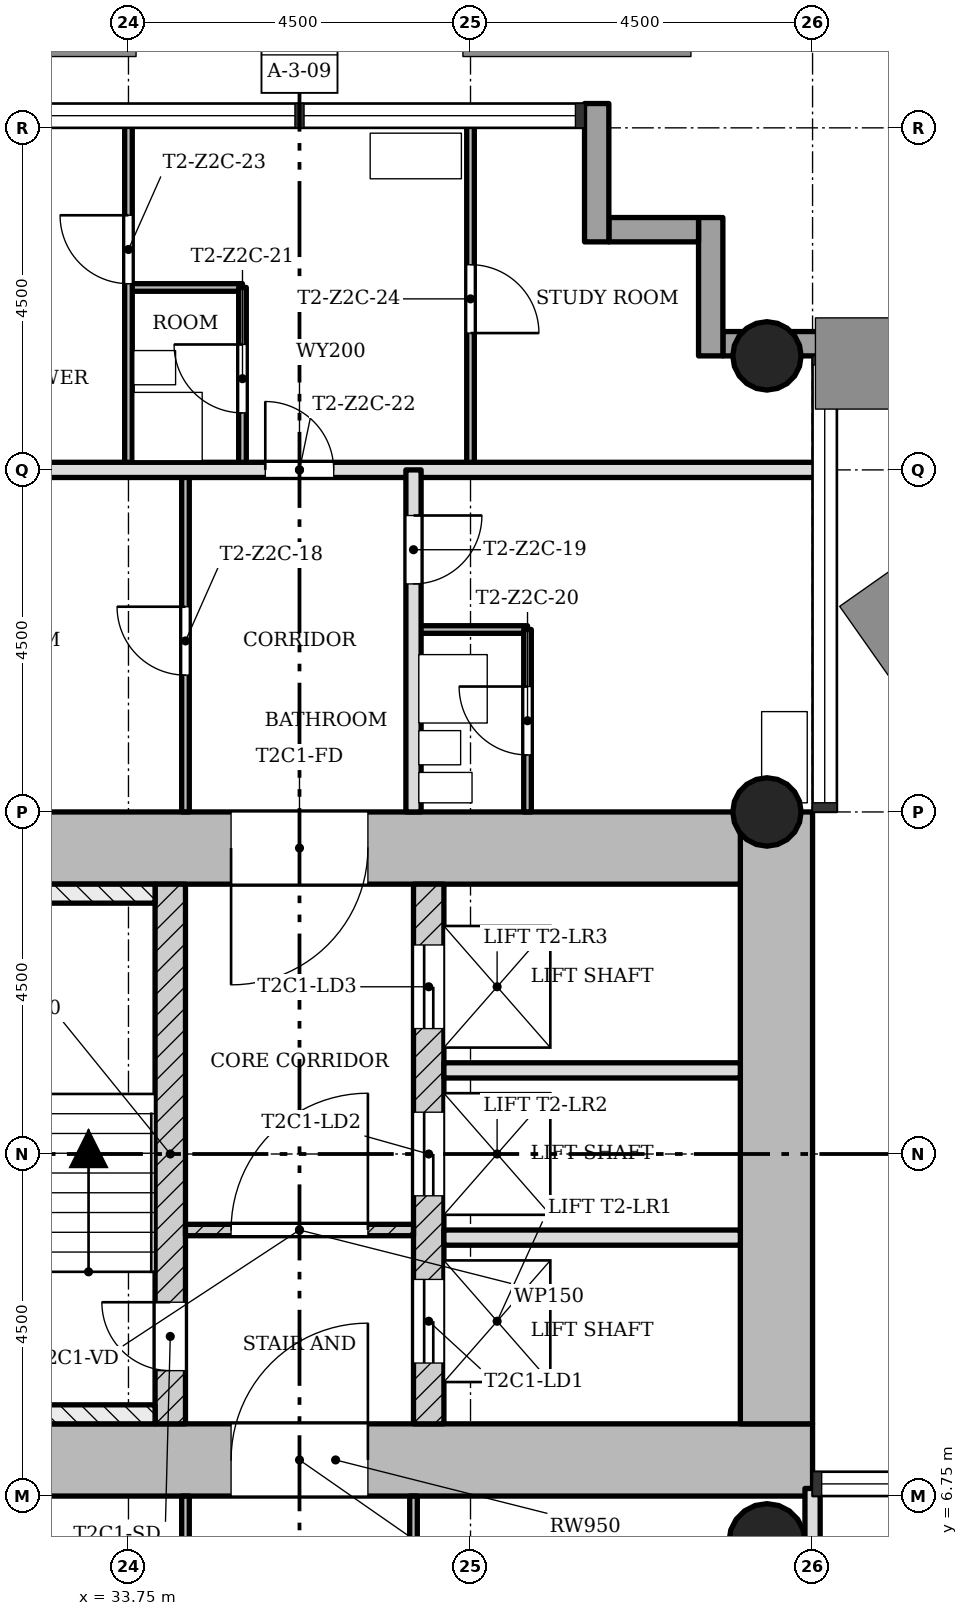
"""IFC4 building model, lengths in metres.
Left out: names, types, materials, properties, quantities, classifications, styles, units other than length and angle.
Written with IfcOpenShell. Run it as: python <this file> out.ifc"""

import sys

from ifc_helpers import new_model, si_unit, direction, frame, frame_2d, origin, origin_2d, place, context, subcontext, project, spatial, rectangle, hollow_circle, extrude, element, fill, save


model = new_model("IFC4")
c1 = context("Model", 3, precision=1e-05, world=origin(), true_north=direction((0.0, 1.0)))
c2 = subcontext(c1, "Body", "Model", "MODEL_VIEW")
j1 = project(units=[si_unit("LENGTHUNIT", "METRE"), si_unit("PLANEANGLEUNIT", "RADIAN")], contexts=[c1])
p1 = place(None, origin())
s1 = spatial("IfcSite", under=j1, at=p1, CompositionType="ELEMENT")
p2 = place(p1, origin())
s2 = spatial("IfcBuilding", under=s1, at=p2, CompositionType="ELEMENT")
p3 = place(p2, frame((0.0, 0.0, 86.8)))
s3 = spatial("IfcBuildingStorey", under=s2, at=p3, CompositionType="ELEMENT", Elevation=86.8)
p4 = place(p3, frame((30.2, 7.225, 0.0), z_axis=(0.0, 0.0, 1.0), x_axis=(1.0, 0.0, 0.0)))
e1 = element("IfcWall", 1, at=p4, inside=s3, PredefinedType="SHEAR", context=c2, shape_type="SweptSolid", body=[
    extrude(rectangle(XDim=12.55, YDim=0.95, at=frame_2d((6.275, 0.0))), origin(), (0.0, 0.0, 1.0), 3.4),
])
p5 = place(p4, frame((4.9, 0.0, 0.0)))
e2 = element("IfcOpeningElement", 2, at=p5, cuts=e1, PredefinedType="OPENING", context=c2, shape_type="SweptSolid", body=[
    extrude(rectangle(XDim=1.8, YDim=2.1, at=frame_2d((0.9, 1.05))), frame((0.0, 0.485, 0.0), z_axis=(0.0, -1.0, 0.0), x_axis=(1.0, 0.0, 0.0)), (0.0, 0.0, 1.0), 0.97),
])
p6 = place(p3, frame((42.275, 7.7, 0.0), z_axis=(0.0, 0.0, 1.0), x_axis=(0.0, 1.0, 0.0)))
e3 = element("IfcWall", 3, at=p6, inside=s3, PredefinedType="SHEAR", context=c2, shape_type="SweptSolid", body=[
    extrude(rectangle(XDim=8.05, YDim=0.95, at=frame_2d((4.025, 0.0))), origin(), (0.0, 0.0, 1.0), 3.4),
])
p7 = place(p3, frame((41.8, 15.275, 0.0), z_axis=(0.0, 0.0, 1.0), x_axis=(-1.0, 0.0, 0.0)))
e4 = element("IfcWall", 4, at=p7, inside=s3, PredefinedType="SHEAR", context=c2, shape_type="SweptSolid", body=[
    extrude(rectangle(XDim=12.55, YDim=0.95, at=frame_2d((6.275, 0.0))), origin(), (0.0, 0.0, 1.0), 3.4),
])
p8 = place(p7, frame((4.9, 0.0, 0.0)))
e5 = element("IfcOpeningElement", 5, at=p8, cuts=e4, PredefinedType="OPENING", context=c2, shape_type="SweptSolid", body=[
    extrude(rectangle(XDim=1.8, YDim=2.1, at=frame_2d((0.9, 1.05))), frame((0.0, 0.485, 0.0), z_axis=(0.0, -1.0, 0.0), x_axis=(1.0, 0.0, 0.0)), (0.0, 0.0, 1.0), 0.97),
])
p9 = place(p3, frame((34.3, 7.7, 0.0), z_axis=(0.0, 0.0, 1.0), x_axis=(0.0, 1.0, 0.0)))
e6 = element("IfcWall", 6, at=p9, inside=s3, PredefinedType="SHEAR", context=c2, shape_type="SweptSolid", body=[
    extrude(rectangle(XDim=7.1, YDim=0.4, at=frame_2d((3.55, 0.0))), origin(), (0.0, 0.0, 1.0), 3.4),
])
p10 = place(p9, frame((0.7, 0.0, 0.0)))
e7 = element("IfcOpeningElement", 7, at=p10, cuts=e6, PredefinedType="OPENING", context=c2, shape_type="SweptSolid", body=[
    extrude(rectangle(XDim=0.9, YDim=2.1, at=frame_2d((0.45, 1.05))), frame((0.0, 0.21, 0.0), z_axis=(0.0, -1.0, 0.0), x_axis=(1.0, 0.0, 0.0)), (0.0, 0.0, 1.0), 0.42),
])
p11 = place(p3, frame((37.7, 7.7, 0.0), z_axis=(0.0, 0.0, 1.0), x_axis=(0.0, 1.0, 0.0)))
e8 = element("IfcWall", 8, at=p11, inside=s3, PredefinedType="SHEAR", context=c2, shape_type="SweptSolid", body=[
    extrude(rectangle(XDim=7.1, YDim=0.4, at=frame_2d((3.55, 0.0))), origin(), (0.0, 0.0, 1.0), 3.4),
])
p12 = place(p11, frame((0.8, 0.0, 0.0)))
e9 = element("IfcOpeningElement", 9, at=p12, cuts=e8, PredefinedType="OPENING", context=c2, shape_type="SweptSolid", body=[
    extrude(rectangle(XDim=1.1, YDim=2.1, at=frame_2d((0.55, 1.05))), frame((0.0, 0.21, 0.0), z_axis=(0.0, -1.0, 0.0), x_axis=(1.0, 0.0, 0.0)), (0.0, 0.0, 1.0), 0.42),
])
p13 = place(p11, frame((3.0, 0.0, 0.0)))
e10 = element("IfcOpeningElement", 10, at=p13, cuts=e8, PredefinedType="OPENING", context=c2, shape_type="SweptSolid", body=[
    extrude(rectangle(XDim=1.1, YDim=2.1, at=frame_2d((0.55, 1.05))), frame((0.0, 0.21, 0.0), z_axis=(0.0, -1.0, 0.0), x_axis=(1.0, 0.0, 0.0)), (0.0, 0.0, 1.0), 0.42),
])
p14 = place(p11, frame((5.2, 0.0, 0.0)))
e11 = element("IfcOpeningElement", 11, at=p14, cuts=e8, PredefinedType="OPENING", context=c2, shape_type="SweptSolid", body=[
    extrude(rectangle(XDim=1.1, YDim=2.1, at=frame_2d((0.55, 1.05))), frame((0.0, 0.21, 0.0), z_axis=(0.0, -1.0, 0.0), x_axis=(1.0, 0.0, 0.0)), (0.0, 0.0, 1.0), 0.42),
])
for number, where, z_axis, x_axis in (
    (12, (42.15, 15.75, 0.0), (0.0, 0.0, 1.0), (1.0, 0.0, 0.0)),
    (13, (42.15, 21.75, 0.0), (0.0, 0.0, 1.0), (1.0, 0.0, 0.0)),
):
    element("IfcColumn", number, at=place(p3, frame(where, z_axis=z_axis, x_axis=x_axis)), inside=s3, PredefinedType="COLUMN", context=c2, shape_type="SweptSolid", body=[
        extrude(hollow_circle(Radius=0.45, WallThickness=0.032, at=origin_2d()), origin(), (0.0, 0.0, 1.0), 3.4),
    ])
p15 = place(p3, frame((42.15, 6.15, 0.0), z_axis=(0.0, 0.0, 1.0), x_axis=(1.0, 0.0, 0.0)))
e14 = element("IfcColumn", 14, at=p15, inside=s3, PredefinedType="COLUMN", context=c2, shape_type="SweptSolid", body=[
    extrude(hollow_circle(Radius=0.5, WallThickness=0.036, at=origin_2d()), origin(), (0.0, 0.0, 1.0), 3.4),
])
p16 = place(p3, frame((43.07, 21.91, -0.3), z_axis=(0.0, 0.0, 1.0), x_axis=(-1.0, 0.0, 0.0)))
e15 = element("IfcWall", 15, at=p16, inside=s3, PredefinedType="STANDARD", context=c2, shape_type="SweptSolid", body=[
    extrude(rectangle(XDim=1.5, YDim=0.32, at=frame_2d((0.75, 0.0))), origin(), (0.0, 0.0, 1.0), 3.4),
])
p17 = place(p3, frame((41.41, 21.75, -0.3), z_axis=(0.0, 0.0, 1.0), x_axis=(0.0, 1.0, 0.0)))
e16 = element("IfcWall", 16, at=p17, inside=s3, PredefinedType="STANDARD", context=c2, shape_type="SweptSolid", body=[
    extrude(rectangle(XDim=1.82, YDim=0.32, at=frame_2d((0.91, 0.0))), origin(), (0.0, 0.0, 1.0), 3.4),
])
p18 = place(p3, frame((41.25, 23.41, -0.3), z_axis=(0.0, 0.0, 1.0), x_axis=(-1.0, 0.0, 0.0)))
e17 = element("IfcWall", 17, at=p18, inside=s3, PredefinedType="STANDARD", context=c2, shape_type="SweptSolid", body=[
    extrude(rectangle(XDim=1.18, YDim=0.32, at=frame_2d((0.59, 0.0))), origin(), (0.0, 0.0, 1.0), 3.4),
])
p19 = place(p3, frame((39.91, 23.25, -0.3), z_axis=(0.0, 0.0, 1.0), x_axis=(0.0, 1.0, 0.0)))
e18 = element("IfcWall", 18, at=p19, inside=s3, PredefinedType="STANDARD", context=c2, shape_type="SweptSolid", body=[
    extrude(rectangle(XDim=1.82, YDim=0.32, at=frame_2d((0.91, 0.0))), origin(), (0.0, 0.0, 1.0), 3.4),
])
p20 = place(p3, frame((37.5, 10.25, 0.0), z_axis=(0.0, 0.0, 1.0), x_axis=(-1.0, 0.0, 0.0)))
e19 = element("IfcWall", 19, at=p20, inside=s3, PredefinedType="PARTITIONING", context=c2, shape_type="SweptSolid", body=[
    extrude(rectangle(XDim=3.0, YDim=0.15, at=frame_2d((1.5, 0.0))), origin(), (0.0, 0.0, 1.0), 3.0),
])
p21 = place(p20, frame((0.6, 0.0, 0.0)))
e20 = element("IfcOpeningElement", 20, at=p21, cuts=e19, PredefinedType="OPENING", context=c2, shape_type="SweptSolid", body=[
    extrude(rectangle(XDim=1.8, YDim=2.1, at=frame_2d((0.9, 1.05))), frame((0.0, 0.085, 0.0), z_axis=(0.0, -1.0, 0.0), x_axis=(1.0, 0.0, 0.0)), (0.0, 0.0, 1.0), 0.17),
])
for number, where, z_axis, x_axis in (
    (21, (41.8, 10.15, 0.0), (0.0, 0.0, 1.0), (-1.0, 0.0, 0.0)),
    (22, (41.8, 12.35, 0.0), (0.0, 0.0, 1.0), (-1.0, 0.0, 0.0)),
):
    element("IfcWall", number, at=place(p3, frame(where, z_axis=z_axis, x_axis=x_axis)), inside=s3, PredefinedType="SOLIDWALL", context=c2, shape_type="SweptSolid", body=[
        extrude(rectangle(XDim=3.9, YDim=0.2, at=frame_2d((1.95, 0.0))), origin(), (0.0, 0.0, 1.0), 3.0),
    ])
p22 = place(p3, frame((39.0, 18.15, 0.0), z_axis=(0.0, 0.0, 1.0), x_axis=(-1.0, 0.0, 0.0)))
e23 = element("IfcWall", 23, at=p22, inside=s3, PredefinedType="PARTITIONING", context=c2, shape_type="SweptSolid", body=[
    extrude(rectangle(XDim=1.5, YDim=0.1, at=frame_2d((0.75, 0.0))), origin(), (0.0, 0.0, 1.0), 3.0),
])
p23 = place(p3, frame((42.85, 20.25, 0.0), z_axis=(0.0, 0.0, 1.0), x_axis=(-1.0, 0.0, 0.0)))
e24 = element("IfcWall", 24, at=p23, inside=s3, PredefinedType="SOLIDWALL", context=c2, shape_type="SweptSolid", body=[
    extrude(rectangle(XDim=13.7, YDim=0.2, at=frame_2d((6.85, 0.0))), origin(), (0.0, 0.0, 1.0), 3.0),
])
p24 = place(p23, frame((6.4, 0.0, 0.0)))
e25 = element("IfcOpeningElement", 25, at=p24, cuts=e24, PredefinedType="OPENING", context=c2, shape_type="SweptSolid", body=[
    extrude(rectangle(XDim=0.9, YDim=2.1, at=frame_2d((0.45, 1.05))), frame((0.0, 0.11, 0.0), z_axis=(0.0, -1.0, 0.0), x_axis=(1.0, 0.0, 0.0)), (0.0, 0.0, 1.0), 0.22),
])
p25 = place(p3, frame((35.25, 22.65, 0.0), z_axis=(0.0, 0.0, 1.0), x_axis=(-1.0, 0.0, 0.0)))
e26 = element("IfcWall", 26, at=p25, inside=s3, PredefinedType="PARTITIONING", context=c2, shape_type="SweptSolid", body=[
    extrude(rectangle(XDim=1.5, YDim=0.1, at=frame_2d((0.75, 0.0))), origin(), (0.0, 0.0, 1.0), 3.0),
])
p26 = place(p3, frame((42.75, 0.9, 0.0), z_axis=(0.0, 0.0, 1.0), x_axis=(0.0, 1.0, 0.0)))
e27 = element("IfcWall", 27, at=p26, inside=s3, PredefinedType="SOLIDWALL", context=c2, shape_type="SweptSolid", body=[
    extrude(rectangle(XDim=5.95, YDim=0.2, at=frame_2d((2.975, 0.0))), origin(), (0.0, 0.0, 1.0), 3.0),
])
p27 = place(p3, frame((39.0, 15.75, 0.0), z_axis=(0.0, 0.0, 1.0), x_axis=(0.0, 1.0, 0.0)))
e28 = element("IfcWall", 28, at=p27, inside=s3, PredefinedType="PARTITIONING", context=c2, shape_type="SweptSolid", body=[
    extrude(rectangle(XDim=2.4, YDim=0.1, at=frame_2d((1.2, 0.0))), origin(), (0.0, 0.0, 1.0), 3.0),
])
p28 = place(p27, frame((0.75, 0.0, 0.0)))
e29 = element("IfcOpeningElement", 29, at=p28, cuts=e28, PredefinedType="OPENING", context=c2, shape_type="SweptSolid", body=[
    extrude(rectangle(XDim=0.9, YDim=2.1, at=frame_2d((0.45, 1.05))), frame((0.0, 0.06, 0.0), z_axis=(0.0, -1.0, 0.0), x_axis=(1.0, 0.0, 0.0)), (0.0, 0.0, 1.0), 0.12),
])
p29 = place(p3, frame((38.25, 20.25, 0.0), z_axis=(0.0, 0.0, 1.0), x_axis=(0.0, 1.0, 0.0)))
e30 = element("IfcWall", 30, at=p29, inside=s3, PredefinedType="PARTITIONING", context=c2, shape_type="SweptSolid", body=[
    extrude(rectangle(XDim=4.6, YDim=0.1, at=frame_2d((2.3, 0.0))), origin(), (0.0, 0.0, 1.0), 3.0),
])
p30 = place(p29, frame((1.8, 0.0, 0.0)))
e31 = element("IfcOpeningElement", 31, at=p30, cuts=e30, PredefinedType="OPENING", context=c2, shape_type="SweptSolid", body=[
    extrude(rectangle(XDim=0.9, YDim=2.1, at=frame_2d((0.45, 1.05))), frame((0.0, 0.06, 0.0), z_axis=(0.0, -1.0, 0.0), x_axis=(1.0, 0.0, 0.0)), (0.0, 0.0, 1.0), 0.12),
])
p31 = place(p3, frame((37.5, 0.9, 0.0), z_axis=(0.0, 0.0, 1.0), x_axis=(0.0, 1.0, 0.0)))
e32 = element("IfcWall", 32, at=p31, inside=s3, PredefinedType="PARTITIONING", context=c2, shape_type="SweptSolid", body=[
    extrude(rectangle(XDim=5.85, YDim=0.1, at=frame_2d((2.925, 0.0))), origin(), (0.0, 0.0, 1.0), 3.0),
])
p32 = place(p31, frame((3.375, 0.0, 0.0)))
e33 = element("IfcOpeningElement", 33, at=p32, cuts=e32, PredefinedType="OPENING", context=c2, shape_type="SweptSolid", body=[
    extrude(rectangle(XDim=0.9, YDim=2.1, at=frame_2d((0.45, 1.05))), frame((0.0, 0.06, 0.0), z_axis=(0.0, -1.0, 0.0), x_axis=(1.0, 0.0, 0.0)), (0.0, 0.0, 1.0), 0.12),
])
p33 = place(p3, frame((37.5, 15.75, 0.0), z_axis=(0.0, 0.0, 1.0), x_axis=(0.0, 1.0, 0.0)))
e34 = element("IfcWall", 34, at=p33, inside=s3, PredefinedType="SOLIDWALL", context=c2, shape_type="SweptSolid", body=[
    extrude(rectangle(XDim=4.5, YDim=0.2, at=frame_2d((2.25, 0.0))), origin(), (0.0, 0.0, 1.0), 3.0),
])
p34 = place(p33, frame((3.0, 0.0, 0.0)))
e35 = element("IfcOpeningElement", 35, at=p34, cuts=e34, PredefinedType="OPENING", context=c2, shape_type="SweptSolid", body=[
    extrude(rectangle(XDim=0.9, YDim=2.1, at=frame_2d((0.45, 1.05))), frame((0.0, 0.11, 0.0), z_axis=(0.0, -1.0, 0.0), x_axis=(1.0, 0.0, 0.0)), (0.0, 0.0, 1.0), 0.22),
])
p35 = place(p3, frame((35.25, 20.25, 0.0), z_axis=(0.0, 0.0, 1.0), x_axis=(0.0, 1.0, 0.0)))
e36 = element("IfcWall", 36, at=p35, inside=s3, PredefinedType="PARTITIONING", context=c2, shape_type="SweptSolid", body=[
    extrude(rectangle(XDim=2.4, YDim=0.1, at=frame_2d((1.2, 0.0))), origin(), (0.0, 0.0, 1.0), 3.0),
])
p36 = place(p35, frame((0.75, 0.0, 0.0)))
e37 = element("IfcOpeningElement", 37, at=p36, cuts=e36, PredefinedType="OPENING", context=c2, shape_type="SweptSolid", body=[
    extrude(rectangle(XDim=0.9, YDim=2.1, at=frame_2d((0.45, 1.05))), frame((0.0, 0.06, 0.0), z_axis=(0.0, -1.0, 0.0), x_axis=(1.0, 0.0, 0.0)), (0.0, 0.0, 1.0), 0.12),
])
p37 = place(p3, frame((34.5, 0.9, 0.0), z_axis=(0.0, 0.0, 1.0), x_axis=(0.0, 1.0, 0.0)))
e38 = element("IfcWall", 38, at=p37, inside=s3, PredefinedType="PARTITIONING", context=c2, shape_type="SweptSolid", body=[
    extrude(rectangle(XDim=5.85, YDim=0.1, at=frame_2d((2.925, 0.0))), origin(), (0.0, 0.0, 1.0), 3.0),
])
p38 = place(p37, frame((2.475, 0.0, 0.0)))
e39 = element("IfcOpeningElement", 39, at=p38, cuts=e38, PredefinedType="OPENING", context=c2, shape_type="SweptSolid", body=[
    extrude(rectangle(XDim=0.9, YDim=2.1, at=frame_2d((0.45, 1.05))), frame((0.0, 0.06, 0.0), z_axis=(0.0, -1.0, 0.0), x_axis=(1.0, 0.0, 0.0)), (0.0, 0.0, 1.0), 0.12),
])
p39 = place(p3, frame((34.5, 15.75, 0.0), z_axis=(0.0, 0.0, 1.0), x_axis=(0.0, 1.0, 0.0)))
e40 = element("IfcWall", 40, at=p39, inside=s3, PredefinedType="PARTITIONING", context=c2, shape_type="SweptSolid", body=[
    extrude(rectangle(XDim=4.5, YDim=0.1, at=frame_2d((2.25, 0.0))), origin(), (0.0, 0.0, 1.0), 3.0),
])
p40 = place(p39, frame((1.8, 0.0, 0.0)))
e41 = element("IfcOpeningElement", 41, at=p40, cuts=e40, PredefinedType="OPENING", context=c2, shape_type="SweptSolid", body=[
    extrude(rectangle(XDim=0.9, YDim=2.1, at=frame_2d((0.45, 1.05))), frame((0.0, 0.06, 0.0), z_axis=(0.0, -1.0, 0.0), x_axis=(1.0, 0.0, 0.0)), (0.0, 0.0, 1.0), 0.12),
])
p41 = place(p3, frame((33.75, 20.25, 0.0), z_axis=(0.0, 0.0, 1.0), x_axis=(0.0, 1.0, 0.0)))
e42 = element("IfcWall", 42, at=p41, inside=s3, PredefinedType="PARTITIONING", context=c2, shape_type="SweptSolid", body=[
    extrude(rectangle(XDim=4.6, YDim=0.1, at=frame_2d((2.3, 0.0))), origin(), (0.0, 0.0, 1.0), 3.0),
])
p42 = place(p41, frame((2.45, 0.0, 0.0)))
e43 = element("IfcOpeningElement", 43, at=p42, cuts=e42, PredefinedType="OPENING", context=c2, shape_type="SweptSolid", body=[
    extrude(rectangle(XDim=0.9, YDim=2.1, at=frame_2d((0.45, 1.05))), frame((0.0, 0.06, 0.0), z_axis=(0.0, -1.0, 0.0), x_axis=(1.0, 0.0, 0.0)), (0.0, 0.0, 1.0), 0.12),
])
for number, where, z_axis, x_axis in (
    (44, (34.1, 14.675, 0.0), (0.0, 0.0, 1.0), (-1.0, 0.0, 0.0)),
    (45, (34.1, 7.825, 0.0), (0.0, 0.0, 1.0), (-1.0, 0.0, 0.0)),
):
    element("IfcWall", number, at=place(p3, frame(where, z_axis=z_axis, x_axis=x_axis)), inside=s3, PredefinedType="SHEAR", context=c2, shape_type="SweptSolid", body=[
        extrude(rectangle(XDim=3.9, YDim=0.25, at=frame_2d((1.95, 0.0))), origin(), (0.0, 0.0, 1.0), 3.4),
    ])
p43 = place(p21, origin())
e46 = element("IfcDoor", 46, at=p43, inside=s3, OperationType="SINGLE_SWING_LEFT", PredefinedType="DOOR", context=c2, shape_type="SweptSolid", body=[
    extrude(rectangle(XDim=1.8, YDim=2.1, at=frame_2d((0.9, 1.05))), frame((0.0, 0.025, 0.0), z_axis=(0.0, -1.0, 0.0), x_axis=(1.0, 0.0, 0.0)), (0.0, 0.0, 1.0), 0.05),
])
fill(e20, e46)
p44 = place(p40, origin())
e47 = element("IfcDoor", 47, at=p44, inside=s3, OperationType="SINGLE_SWING_LEFT", PredefinedType="DOOR", context=c2, shape_type="SweptSolid", body=[
    extrude(rectangle(XDim=0.9, YDim=2.1, at=frame_2d((0.45, 1.05))), frame((0.0, 0.025, 0.0), z_axis=(0.0, -1.0, 0.0), x_axis=(1.0, 0.0, 0.0)), (0.0, 0.0, 1.0), 0.05),
])
fill(e41, e47)
p45 = place(p34, origin())
e48 = element("IfcDoor", 48, at=p45, inside=s3, OperationType="SINGLE_SWING_RIGHT", PredefinedType="DOOR", context=c2, shape_type="SweptSolid", body=[
    extrude(rectangle(XDim=0.9, YDim=2.1, at=frame_2d((0.45, 1.05))), frame((0.0, 0.025, 0.0), z_axis=(0.0, -1.0, 0.0), x_axis=(1.0, 0.0, 0.0)), (0.0, 0.0, 1.0), 0.05),
])
fill(e35, e48)
p46 = place(p28, origin())
e49 = element("IfcDoor", 49, at=p46, inside=s3, OperationType="SINGLE_SWING_LEFT", PredefinedType="DOOR", context=c2, shape_type="SweptSolid", body=[
    extrude(rectangle(XDim=0.9, YDim=2.1, at=frame_2d((0.45, 1.05))), frame((0.0, 0.025, 0.0), z_axis=(0.0, -1.0, 0.0), x_axis=(1.0, 0.0, 0.0)), (0.0, 0.0, 1.0), 0.05),
])
fill(e29, e49)
p47 = place(p36, origin())
e50 = element("IfcDoor", 50, at=p47, inside=s3, OperationType="SINGLE_SWING_LEFT", PredefinedType="DOOR", context=c2, shape_type="SweptSolid", body=[
    extrude(rectangle(XDim=0.9, YDim=2.1, at=frame_2d((0.45, 1.05))), frame((0.0, 0.025, 0.0), z_axis=(0.0, -1.0, 0.0), x_axis=(1.0, 0.0, 0.0)), (0.0, 0.0, 1.0), 0.05),
])
fill(e37, e50)
p48 = place(p24, origin())
e51 = element("IfcDoor", 51, at=p48, inside=s3, OperationType="SINGLE_SWING_RIGHT", PredefinedType="DOOR", context=c2, shape_type="SweptSolid", body=[
    extrude(rectangle(XDim=0.9, YDim=2.1, at=frame_2d((0.45, 1.05))), frame((0.0, 0.025, 0.0), z_axis=(0.0, -1.0, 0.0), x_axis=(1.0, 0.0, 0.0)), (0.0, 0.0, 1.0), 0.05),
])
fill(e25, e51)
p49 = place(p42, origin())
e52 = element("IfcDoor", 52, at=p49, inside=s3, OperationType="SINGLE_SWING_LEFT", PredefinedType="DOOR", context=c2, shape_type="SweptSolid", body=[
    extrude(rectangle(XDim=0.9, YDim=2.1, at=frame_2d((0.45, 1.05))), frame((0.0, 0.025, 0.0), z_axis=(0.0, -1.0, 0.0), x_axis=(1.0, 0.0, 0.0)), (0.0, 0.0, 1.0), 0.05),
])
fill(e43, e52)
p50 = place(p30, origin())
e53 = element("IfcDoor", 53, at=p50, inside=s3, OperationType="SINGLE_SWING_LEFT", PredefinedType="DOOR", context=c2, shape_type="SweptSolid", body=[
    extrude(rectangle(XDim=0.9, YDim=2.1, at=frame_2d((0.45, 1.05))), frame((0.0, 0.025, 0.0), z_axis=(0.0, -1.0, 0.0), x_axis=(1.0, 0.0, 0.0)), (0.0, 0.0, 1.0), 0.05),
])
fill(e31, e53)
p51 = place(p10, origin())
e54 = element("IfcDoor", 54, at=p51, inside=s3, OperationType="SINGLE_SWING_LEFT", PredefinedType="DOOR", context=c2, shape_type="SweptSolid", body=[
    extrude(rectangle(XDim=0.9, YDim=2.1, at=frame_2d((0.45, 1.05))), frame((0.0, 0.025, 0.0), z_axis=(0.0, -1.0, 0.0), x_axis=(1.0, 0.0, 0.0)), (0.0, 0.0, 1.0), 0.05),
])
fill(e7, e54)
p52 = place(p12, origin())
e55 = element("IfcDoor", 55, at=p52, inside=s3, OperationType="SLIDING_TO_LEFT", PredefinedType="DOOR", context=c2, shape_type="SweptSolid", body=[
    extrude(rectangle(XDim=1.1, YDim=2.1, at=frame_2d((0.55, 1.05))), frame((0.0, 0.025, 0.0), z_axis=(0.0, -1.0, 0.0), x_axis=(1.0, 0.0, 0.0)), (0.0, 0.0, 1.0), 0.05),
])
fill(e9, e55)
p53 = place(p13, origin())
e56 = element("IfcDoor", 56, at=p53, inside=s3, OperationType="SLIDING_TO_LEFT", PredefinedType="DOOR", context=c2, shape_type="SweptSolid", body=[
    extrude(rectangle(XDim=1.1, YDim=2.1, at=frame_2d((0.55, 1.05))), frame((0.0, 0.025, 0.0), z_axis=(0.0, -1.0, 0.0), x_axis=(1.0, 0.0, 0.0)), (0.0, 0.0, 1.0), 0.05),
])
fill(e10, e56)
p54 = place(p14, origin())
e57 = element("IfcDoor", 57, at=p54, inside=s3, OperationType="SLIDING_TO_LEFT", PredefinedType="DOOR", context=c2, shape_type="SweptSolid", body=[
    extrude(rectangle(XDim=1.1, YDim=2.1, at=frame_2d((0.55, 1.05))), frame((0.0, 0.025, 0.0), z_axis=(0.0, -1.0, 0.0), x_axis=(1.0, 0.0, 0.0)), (0.0, 0.0, 1.0), 0.05),
])
fill(e11, e57)
p55 = place(p5, origin())
e58 = element("IfcDoor", 58, at=p55, inside=s3, OperationType="SINGLE_SWING_LEFT", PredefinedType="DOOR", context=c2, shape_type="SweptSolid", body=[
    extrude(rectangle(XDim=1.8, YDim=2.1, at=frame_2d((0.9, 1.05))), frame((0.0, 0.025, 0.0), z_axis=(0.0, -1.0, 0.0), x_axis=(1.0, 0.0, 0.0)), (0.0, 0.0, 1.0), 0.05),
])
fill(e2, e58)
p56 = place(p8, origin())
e59 = element("IfcDoor", 59, at=p56, inside=s3, OperationType="SINGLE_SWING_LEFT", PredefinedType="DOOR", context=c2, shape_type="SweptSolid", body=[
    extrude(rectangle(XDim=1.8, YDim=2.1, at=frame_2d((0.9, 1.05))), frame((0.0, 0.025, 0.0), z_axis=(0.0, -1.0, 0.0), x_axis=(1.0, 0.0, 0.0)), (0.0, 0.0, 1.0), 0.05),
])
fill(e5, e59)
save(model, sys.argv[1])
